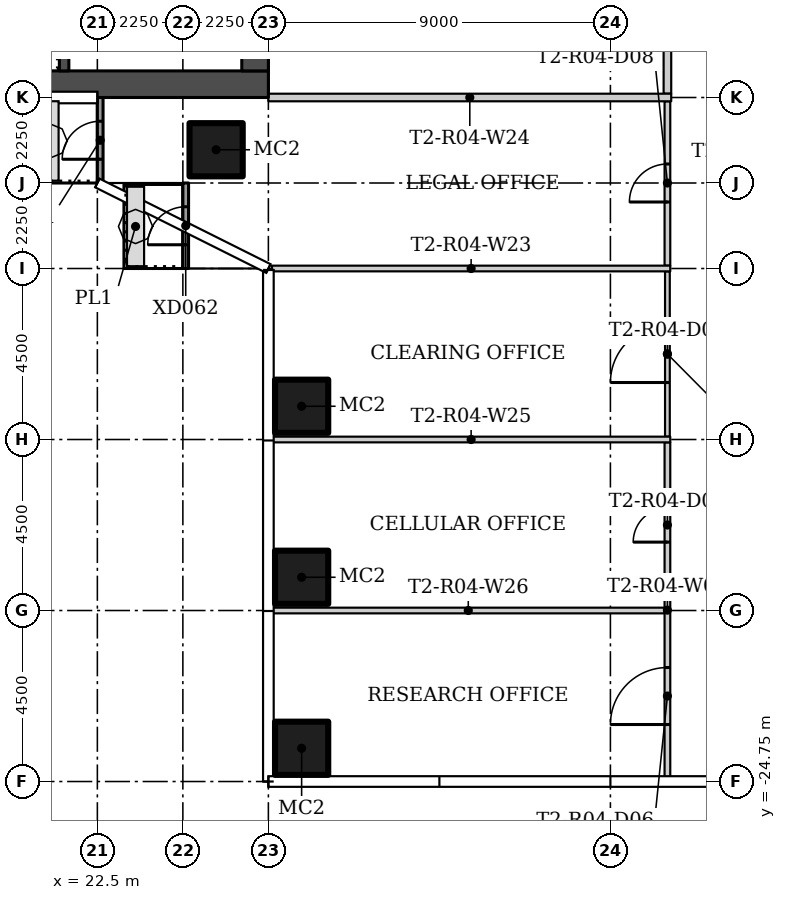
"""IFC4 building model, lengths in metres.
Left out: names, types, materials, properties, quantities, classifications, styles, units other than length and angle.
Written with IfcOpenShell. Run it as: python <this file> out.ifc"""

import sys

from ifc_helpers import new_model, si_unit, direction, frame, frame_2d, origin, origin_2d, place, context, subcontext, project, spatial, rectangle, hollow_rectangle, extrude, element, fill, save


model = new_model("IFC4")
c1 = context("Model", 3, precision=1e-05, world=origin(), true_north=direction((0.0, 1.0)))
c2 = subcontext(c1, "Body", "Model", "MODEL_VIEW")
j1 = project(units=[si_unit("LENGTHUNIT", "METRE"), si_unit("PLANEANGLEUNIT", "RADIAN")], contexts=[c1])
p1 = place(None, origin())
s1 = spatial("IfcSite", under=j1, at=p1, CompositionType="ELEMENT")
p2 = place(p1, origin())
s2 = spatial("IfcBuilding", under=s1, at=p2, CompositionType="ELEMENT")
p3 = place(p2, frame((0.0, 0.0, 49.8)))
s3 = spatial("IfcBuildingStorey", under=s2, at=p3, CompositionType="ELEMENT", Elevation=49.8)
for number, where in (
    (1, (25.625, -8.125, 0.0)),
    (2, (27.875, -14.875, 0.0)),
    (3, (27.875, -19.375, 0.0)),
    (4, (27.875, -23.875, 0.0)),
):
    element("IfcColumn", number, at=place(p3, frame(where)), inside=s3, PredefinedType="COLUMN", context=c2, shape_type="SweptSolid", body=[
        extrude(hollow_rectangle(XDim=1.4, YDim=1.4, WallThickness=0.05, at=origin_2d()), origin(), (0.0, 0.0, 1.0), 3.55),
    ])
p4 = place(p3, frame((37.5, -11.175, 0.0), z_axis=(0.0, 0.0, 1.0), x_axis=(0.0, 1.0, 0.0)))
e5 = element("IfcWall", 5, at=p4, inside=s3, PredefinedType="PARTITIONING", context=c2, shape_type="SweptSolid", body=[
    extrude(rectangle(XDim=4.325, YDim=0.15, at=frame_2d((2.163, 0.0))), origin(), (0.0, 0.0, 1.0), 3.55),
])
p5 = place(p4, frame((1.675, 0.0, 0.0)))
e6 = element("IfcOpeningElement", 6, at=p5, cuts=e5, PredefinedType="OPENING", context=c2, shape_type="SweptSolid", body=[
    extrude(rectangle(XDim=1.0, YDim=2.4, at=frame_2d((0.5, 1.2))), frame((0.0, 0.085, 0.0), z_axis=(0.0, -1.0, 0.0), x_axis=(1.0, 0.0, 0.0)), (0.0, 0.0, 1.0), 0.17),
])
p6 = place(p3, frame((37.5, -24.655, 0.0), z_axis=(0.0, 0.0, 1.0), x_axis=(0.0, 1.0, 0.0)))
e7 = element("IfcWall", 7, at=p6, inside=s3, PredefinedType="PARTITIONING", context=c2, shape_type="SweptSolid", body=[
    extrude(rectangle(XDim=8.83, YDim=0.15, at=frame_2d((4.415, 0.0))), origin(), (0.0, 0.0, 1.0), 3.55),
])
p7 = place(p6, frame((6.205, 0.0, 0.0)))
e8 = element("IfcOpeningElement", 8, at=p7, cuts=e7, PredefinedType="OPENING", context=c2, shape_type="SweptSolid", body=[
    extrude(rectangle(XDim=0.9, YDim=2.1, at=frame_2d((0.45, 1.05))), frame((0.0, 0.085, 0.0), z_axis=(0.0, -1.0, 0.0), x_axis=(1.0, 0.0, 0.0)), (0.0, 0.0, 1.0), 0.17),
])
p8 = place(p6, frame((1.405, 0.0, 0.0)))
e9 = element("IfcOpeningElement", 9, at=p8, cuts=e7, PredefinedType="OPENING", context=c2, shape_type="SweptSolid", body=[
    extrude(rectangle(XDim=1.5, YDim=2.1, at=frame_2d((0.75, 1.05))), frame((0.0, 0.085, 0.0), z_axis=(0.0, -1.0, 0.0), x_axis=(1.0, 0.0, 0.0)), (0.0, 0.0, 1.0), 0.17),
])
p9 = place(p3, frame((37.5, -15.675, 0.0), z_axis=(0.0, 0.0, 1.0), x_axis=(0.0, 1.0, 0.0)))
e10 = element("IfcWall", 10, at=p9, inside=s3, PredefinedType="PARTITIONING", context=c2, shape_type="SweptSolid", body=[
    extrude(rectangle(XDim=4.35, YDim=0.125, at=frame_2d((2.175, 0.0))), origin(), (0.0, 0.0, 1.0), 3.55),
])
p10 = place(p9, frame((1.425, 0.0, 0.0)))
e11 = element("IfcOpeningElement", 11, at=p10, cuts=e10, PredefinedType="OPENING", context=c2, shape_type="SweptSolid", body=[
    extrude(rectangle(XDim=1.5, YDim=2.1, at=frame_2d((0.75, 1.05))), frame((0.0, 0.073, 0.0), z_axis=(0.0, -1.0, 0.0), x_axis=(1.0, 0.0, 0.0)), (0.0, 0.0, 1.0), 0.145),
])
p11 = place(p3, frame((37.5, -6.65, 0.0), z_axis=(0.0, 0.0, 1.0), x_axis=(0.0, 1.0, 0.0)))
e12 = element("IfcWall", 12, at=p11, inside=s3, PredefinedType="PARTITIONING", context=c2, shape_type="SweptSolid", body=[
    extrude(rectangle(XDim=6.6, YDim=0.2, at=frame_2d((3.3, 0.0))), origin(), (0.0, 0.0, 1.0), 3.55),
])
p12 = place(p3, frame((27.095, -11.25, 0.0)))
e13 = element("IfcWall", 13, at=p12, inside=s3, PredefinedType="PARTITIONING", context=c2, shape_type="SweptSolid", body=[
    extrude(rectangle(XDim=10.48, YDim=0.15, at=frame_2d((5.24, 0.0))), origin(), (0.0, 0.0, 1.0), 3.55),
])
p13 = place(p3, frame((37.6, -6.75, 0.0), z_axis=(0.0, 0.0, 1.0), x_axis=(-1.0, 0.0, 0.0)))
e14 = element("IfcWall", 14, at=p13, inside=s3, PredefinedType="PARTITIONING", context=c2, shape_type="SweptSolid", body=[
    extrude(rectangle(XDim=10.6, YDim=0.2, at=frame_2d((5.3, 0.0))), origin(), (0.0, 0.0, 1.0), 3.55),
])
p14 = place(p3, frame((27.095, -15.75, 0.0)))
e15 = element("IfcWall", 15, at=p14, inside=s3, PredefinedType="PARTITIONING", context=c2, shape_type="SweptSolid", body=[
    extrude(rectangle(XDim=10.48, YDim=0.15, at=frame_2d((5.24, 0.0))), origin(), (0.0, 0.0, 1.0), 3.55),
])
p15 = place(p3, frame((27.095, -20.25, 0.0)))
e16 = element("IfcWall", 16, at=p15, inside=s3, PredefinedType="PARTITIONING", context=c2, shape_type="SweptSolid", body=[
    extrude(rectangle(XDim=10.33, YDim=0.15, at=frame_2d((5.165, 0.0))), origin(), (0.0, 0.0, 1.0), 3.55),
])
p16 = place(p3, frame((22.575, -9.0, 0.0), z_axis=(0.0, 0.0, 1.0), x_axis=(0.0, 1.0, 0.0)))
e17 = element("IfcWall", 17, at=p16, inside=s3, PredefinedType="SOLIDWALL", context=c2, shape_type="SweptSolid", body=[
    extrude(rectangle(XDim=2.257, YDim=0.15, at=frame_2d((1.128, 0.0))), origin(), (0.0, 0.0, 1.0), 3.45),
])
p17 = place(p16, frame((0.625, 0.0, 0.0)))
e18 = element("IfcOpeningElement", 18, at=p17, cuts=e17, PredefinedType="OPENING", context=c2, shape_type="SweptSolid", body=[
    extrude(rectangle(XDim=1.0, YDim=2.4, at=frame_2d((0.5, 1.2))), frame((0.0, 0.085, 0.0), z_axis=(0.0, -1.0, 0.0), x_axis=(1.0, 0.0, 0.0)), (0.0, 0.0, 1.0), 0.17),
])
p18 = place(p3, frame((24.825, -11.25, 0.0), z_axis=(0.0, 0.0, 1.0), x_axis=(0.0, 1.0, 0.0)))
e19 = element("IfcWall", 19, at=p18, inside=s3, PredefinedType="SOLIDWALL", context=c2, shape_type="SweptSolid", body=[
    extrude(rectangle(XDim=2.25, YDim=0.15, at=frame_2d((1.125, 0.0))), origin(), (0.0, 0.0, 1.0), 3.45),
])
p19 = place(p18, frame((0.625, 0.0, 0.0)))
e20 = element("IfcOpeningElement", 20, at=p19, cuts=e19, PredefinedType="OPENING", context=c2, shape_type="SweptSolid", body=[
    extrude(rectangle(XDim=1.0, YDim=2.4, at=frame_2d((0.5, 1.2))), frame((0.0, 0.085, 0.0), z_axis=(0.0, -1.0, 0.0), x_axis=(1.0, 0.0, 0.0)), (0.0, 0.0, 1.0), 0.17),
])
p20 = place(p3, frame((13.5, -6.4, 0.0)))
e21 = element("IfcWall", 21, at=p20, inside=s3, PredefinedType="SHEAR", context=c2, shape_type="SweptSolid", body=[
    extrude(rectangle(XDim=13.5, YDim=0.7, at=frame_2d((6.75, 0.0))), origin(), (0.0, 0.0, 1.0), 3.55),
])
p21 = place(p3, frame((26.65, 6.05, 0.0), z_axis=(0.0, 0.0, 1.0), x_axis=(0.0, -1.0, 0.0)))
e22 = element("IfcWall", 22, at=p21, inside=s3, PredefinedType="SHEAR", context=c2, shape_type="SweptSolid", body=[
    extrude(rectangle(XDim=12.1, YDim=0.7, at=frame_2d((6.05, 0.0))), origin(), (0.0, 0.0, 1.0), 3.55),
])
p22 = place(p21, frame((10.1, 0.0, 0.0)))
e23 = element("IfcOpeningElement", 23, at=p22, cuts=e22, PredefinedType="OPENING", context=c2, shape_type="SweptSolid", body=[
    extrude(rectangle(XDim=1.2, YDim=2.1, at=frame_2d((0.6, 1.05))), frame((0.0, 0.36, 0.0), z_axis=(0.0, -1.0, 0.0), x_axis=(1.0, 0.0, 0.0)), (0.0, 0.0, 1.0), 0.72),
])
p23 = place(p21, frame((3.9, 0.0, 0.0)))
e24 = element("IfcOpeningElement", 24, at=p23, cuts=e22, PredefinedType="OPENING", context=c2, shape_type="SweptSolid", body=[
    extrude(rectangle(XDim=1.8, YDim=2.4, at=frame_2d((0.9, 1.2))), frame((0.0, 0.36, 0.0), z_axis=(0.0, -1.0, 0.0), x_axis=(1.0, 0.0, 0.0)), (0.0, 0.0, 1.0), 0.72),
])
p24 = place(p3, frame((21.625, -6.05, 0.0), z_axis=(0.0, 0.0, 1.0), x_axis=(0.0, 1.0, 0.0)))
e25 = element("IfcWall", 25, at=p24, inside=s3, PredefinedType="SHEAR", context=c2, shape_type="SweptSolid", body=[
    extrude(rectangle(XDim=2.55, YDim=0.25, at=frame_2d((1.275, 0.0))), origin(), (0.0, 0.0, 1.0), 3.55),
])
p25 = place(p7, origin())
e26 = element("IfcDoor", 26, at=p25, inside=s3, OperationType="SINGLE_SWING_LEFT", PredefinedType="DOOR", context=c2, shape_type="SweptSolid", body=[
    extrude(rectangle(XDim=0.9, YDim=2.1, at=frame_2d((0.45, 1.05))), frame((0.0, 0.025, 0.0), z_axis=(0.0, -1.0, 0.0), x_axis=(1.0, 0.0, 0.0)), (0.0, 0.0, 1.0), 0.05),
])
fill(e8, e26)
p26 = place(p8, origin())
e27 = element("IfcDoor", 27, at=p26, inside=s3, OperationType="DOUBLE_DOOR_SINGLE_SWING", PredefinedType="DOOR", context=c2, shape_type="SweptSolid", body=[
    extrude(rectangle(XDim=1.5, YDim=2.1, at=frame_2d((0.75, 1.05))), frame((0.0, 0.025, 0.0), z_axis=(0.0, -1.0, 0.0), x_axis=(1.0, 0.0, 0.0)), (0.0, 0.0, 1.0), 0.05),
])
fill(e9, e27)
p27 = place(p10, origin())
e28 = element("IfcDoor", 28, at=p27, inside=s3, OperationType="DOUBLE_DOOR_SINGLE_SWING", PredefinedType="DOOR", context=c2, shape_type="SweptSolid", body=[
    extrude(rectangle(XDim=1.5, YDim=2.1, at=frame_2d((0.75, 1.05))), frame((0.0, 0.025, 0.0), z_axis=(0.0, -1.0, 0.0), x_axis=(1.0, 0.0, 0.0)), (0.0, 0.0, 1.0), 0.05),
])
fill(e11, e28)
p28 = place(p5, origin())
e29 = element("IfcDoor", 29, at=p28, inside=s3, OperationType="SINGLE_SWING_RIGHT", PredefinedType="DOOR", context=c2, shape_type="SweptSolid", body=[
    extrude(rectangle(XDim=1.0, YDim=2.4, at=frame_2d((0.5, 1.2))), frame((0.0, 0.025, 0.0), z_axis=(0.0, -1.0, 0.0), x_axis=(1.0, 0.0, 0.0)), (0.0, 0.0, 1.0), 0.05),
])
fill(e6, e29)
p29 = place(p17, origin())
e30 = element("IfcDoor", 30, at=p29, inside=s3, OperationType="SINGLE_SWING_LEFT", PredefinedType="DOOR", context=c2, shape_type="SweptSolid", body=[
    extrude(rectangle(XDim=1.0, YDim=2.4, at=frame_2d((0.5, 1.2))), frame((0.0, 0.025, 0.0), z_axis=(0.0, -1.0, 0.0), x_axis=(1.0, 0.0, 0.0)), (0.0, 0.0, 1.0), 0.05),
])
fill(e18, e30)
p30 = place(p19, origin())
e31 = element("IfcDoor", 31, at=p30, inside=s3, OperationType="SINGLE_SWING_RIGHT", PredefinedType="DOOR", context=c2, shape_type="SweptSolid", body=[
    extrude(rectangle(XDim=1.0, YDim=2.4, at=frame_2d((0.5, 1.2))), frame((0.0, 0.025, 0.0), z_axis=(0.0, -1.0, 0.0), x_axis=(1.0, 0.0, 0.0)), (0.0, 0.0, 1.0), 0.05),
])
fill(e20, e31)
save(model, sys.argv[1])
